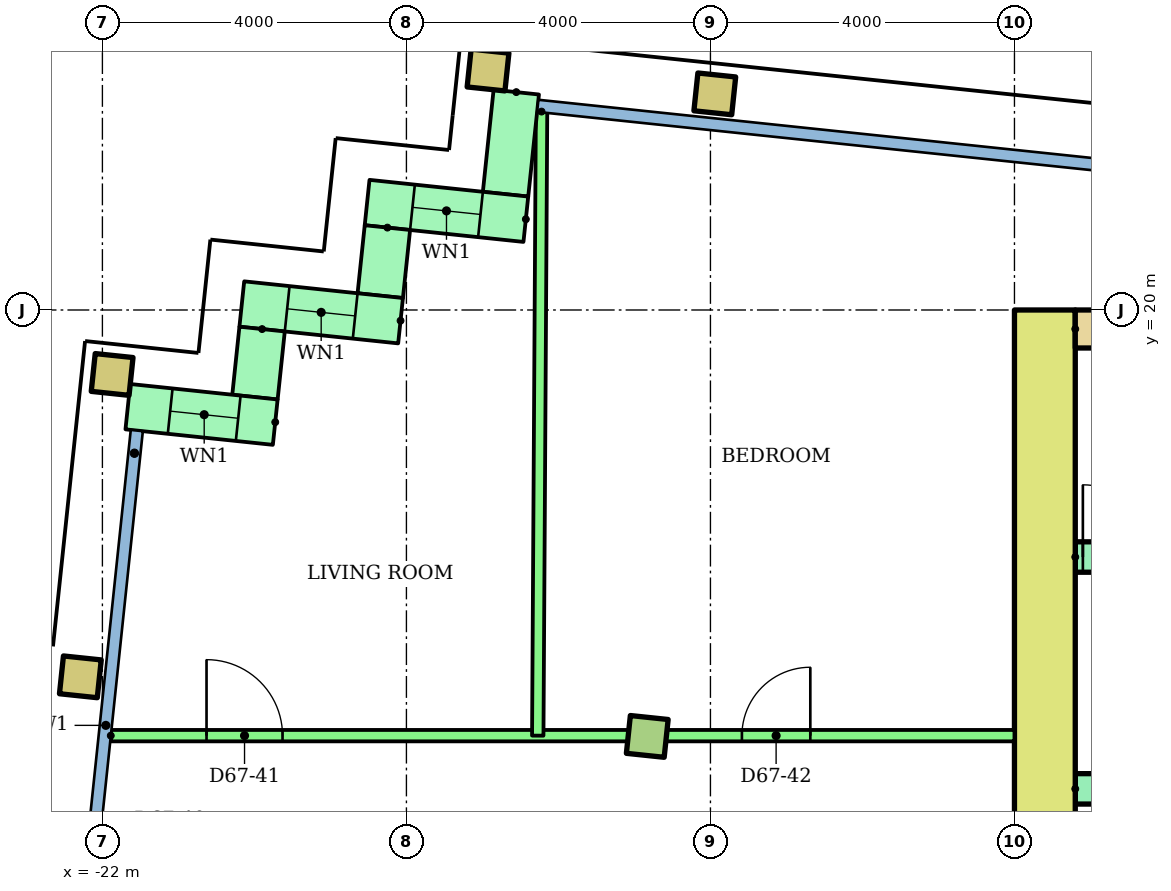
"""IFC4 building model, lengths in metres.
Left out: names, types, materials, properties, quantities, classifications, styles, units other than length and angle.
Written with IfcOpenShell. Run it as: python <this file> out.ifc"""

import sys

from ifc_helpers import new_model, si_unit, direction, frame, frame_2d, origin, origin_2d, place, context, subcontext, project, spatial, rectangle, hollow_rectangle, extrude, element, fill, save


model = new_model("IFC4")
c1 = context("Model", 3, precision=1e-05, world=origin(), true_north=direction((0.0, 1.0)))
c2 = subcontext(c1, "Body", "Model", "MODEL_VIEW")
j1 = project(units=[si_unit("LENGTHUNIT", "METRE"), si_unit("PLANEANGLEUNIT", "RADIAN")], contexts=[c1])
p1 = place(None, origin())
s1 = spatial("IfcSite", under=j1, at=p1, CompositionType="ELEMENT")
p2 = place(p1, origin())
s2 = spatial("IfcBuilding", under=s1, at=p2, CompositionType="ELEMENT")
p3 = place(p2, frame((0.0, 0.0, 259.5)))
s3 = spatial("IfcBuildingStorey", under=s2, at=p3, CompositionType="ELEMENT", Elevation=259.5)
p4 = place(p3, frame((-22.29, 15.174, 0.0), z_axis=(0.0, 0.0, 1.0), x_axis=(0.994521895368, -0.104528463268, 0.0)))
e1 = element("IfcColumn", 1, at=p4, inside=s3, PredefinedType="COLUMN", context=c2, shape_type="SweptSolid", body=[
    extrude(hollow_rectangle(XDim=0.5, YDim=0.5, WallThickness=0.025, at=origin_2d()), origin(), (0.0, 0.0, 1.0), 3.2),
])
p5 = place(p3, frame((-14.831, 14.39, 0.0), z_axis=(0.0, 0.0, 1.0), x_axis=(0.994521895368, -0.104528463268, 0.0)))
e2 = element("IfcColumn", 2, at=p5, inside=s3, PredefinedType="COLUMN", context=c2, shape_type="SweptSolid", body=[
    extrude(rectangle(XDim=0.5, YDim=0.5, at=origin_2d()), origin(), (0.0, 0.0, 1.0), 3.2),
])
for number, where, z_axis, x_axis in (
    (3, (-21.872, 19.152, 0.0), (0.0, 0.0, 1.0), (0.995, -0.105, 0.0)),
    (4, (-16.926, 23.157, 0.0), (0.0, 0.0, 1.0), (0.995, -0.105, 0.0)),
    (5, (-13.943, 22.843, 0.0), (0.0, 0.0, 1.0), (0.995, -0.105, 0.0)),
):
    element("IfcColumn", number, at=place(p3, frame(where, z_axis=z_axis, x_axis=x_axis)), inside=s3, PredefinedType="COLUMN", context=c2, shape_type="SweptSolid", body=[
        extrude(hollow_rectangle(XDim=0.5, YDim=0.5, WallThickness=0.025, at=origin_2d()), origin(), (0.0, 0.0, 1.0), 3.2),
    ])
p6 = place(p3, frame((-16.555, 22.866, 0.0), z_axis=(0.0, 0.0, 1.0), x_axis=(-0.104515354875, -0.994523273029, 0.0)))
e6 = element("IfcWall", 6, at=p6, inside=s3, PredefinedType="STANDARD", context=c2, shape_type="SweptSolid", body=[
    extrude(rectangle(XDim=1.35, YDim=0.6, at=frame_2d((0.675, 0.0))), origin(), (0.0, 0.0, 1.0), 2.92),
])
p7 = place(p3, frame((-16.429, 21.194, 0.0), z_axis=(0.0, 0.0, 1.0), x_axis=(-0.994522640205, 0.104521376379, 0.0)))
e7 = element("IfcWall", 7, at=p7, inside=s3, PredefinedType="STANDARD", context=c2, shape_type="SweptSolid", body=[
    extrude(rectangle(XDim=2.1, YDim=0.6, at=frame_2d((1.05, 0.0))), origin(), (0.0, 0.0, 1.0), 2.92),
])
p8 = place(p7, frame((0.6, 0.0, 0.9)))
e8 = element("IfcOpeningElement", 8, at=p8, cuts=e7, PredefinedType="OPENING", context=c2, shape_type="SweptSolid", body=[
    extrude(rectangle(XDim=0.9, YDim=1.5, at=frame_2d((0.45, 0.75))), frame((0.0, 0.31, 0.0), z_axis=(0.0, -1.0, 0.0), x_axis=(1.0, 0.0, 0.0)), (0.0, 0.0, 1.0), 0.62),
])
p9 = place(p3, frame((-18.25, 21.084, 0.0), z_axis=(0.0, 0.0, 1.0), x_axis=(-0.104416541099, -0.994533652495, 0.0)))
e9 = element("IfcWall", 9, at=p9, inside=s3, PredefinedType="STANDARD", context=c2, shape_type="SweptSolid", body=[
    extrude(rectangle(XDim=0.9, YDim=0.6, at=frame_2d((0.45, 0.0))), origin(), (0.0, 0.0, 1.0), 2.92),
])
p10 = place(p3, frame((-18.077, 19.859, 0.0), z_axis=(0.0, 0.0, 1.0), x_axis=(-0.994522640205, 0.104521376379, 0.0)))
e10 = element("IfcWall", 10, at=p10, inside=s3, PredefinedType="STANDARD", context=c2, shape_type="SweptSolid", body=[
    extrude(rectangle(XDim=2.1, YDim=0.6, at=frame_2d((1.05, 0.0))), origin(), (0.0, 0.0, 1.0), 2.92),
])
p11 = place(p10, frame((0.6, 0.0, 0.9)))
e11 = element("IfcOpeningElement", 11, at=p11, cuts=e10, PredefinedType="OPENING", context=c2, shape_type="SweptSolid", body=[
    extrude(rectangle(XDim=0.9, YDim=1.5, at=frame_2d((0.45, 0.75))), frame((0.0, 0.31, 0.0), z_axis=(0.0, -1.0, 0.0), x_axis=(1.0, 0.0, 0.0)), (0.0, 0.0, 1.0), 0.62),
])
p12 = place(p3, frame((-19.899, 19.749, 0.0), z_axis=(0.0, 0.0, 1.0), x_axis=(-0.104741284723, -0.994499503909, 0.0)))
e12 = element("IfcWall", 12, at=p12, inside=s3, PredefinedType="STANDARD", context=c2, shape_type="SweptSolid", body=[
    extrude(rectangle(XDim=0.9, YDim=0.6, at=frame_2d((0.45, 0.0))), origin(), (0.0, 0.0, 1.0), 2.92),
])
p13 = place(p3, frame((-19.726, 18.524, 0.0), z_axis=(0.0, 0.0, 1.0), x_axis=(-0.994534226826, 0.104411070641, 0.0)))
e13 = element("IfcWall", 13, at=p13, inside=s3, PredefinedType="STANDARD", context=c2, shape_type="SweptSolid", body=[
    extrude(rectangle(XDim=1.95, YDim=0.6, at=frame_2d((0.975, 0.0))), origin(), (0.0, 0.0, 1.0), 2.92),
])
p14 = place(p13, frame((0.49, 0.0, 0.9)))
e14 = element("IfcOpeningElement", 14, at=p14, cuts=e13, PredefinedType="OPENING", context=c2, shape_type="SweptSolid", body=[
    extrude(rectangle(XDim=0.9, YDim=1.5, at=frame_2d((0.45, 0.75))), frame((0.0, 0.31, 0.0), z_axis=(0.0, -1.0, 0.0), x_axis=(1.0, 0.0, 0.0)), (0.0, 0.0, 1.0), 0.62),
])
p15 = place(p3, frame((-9.6, 6.4, 0.0), z_axis=(0.0, 0.0, 1.0), x_axis=(0.0, 1.0, 0.0)))
e15 = element("IfcWall", 15, at=p15, inside=s3, PredefinedType="SHEAR", context=c2, shape_type="SweptSolid", body=[
    extrude(rectangle(XDim=13.6, YDim=0.8, at=frame_2d((6.8, 0.0))), origin(), (0.0, 0.0, 1.0), 2.92),
])
p16 = place(p3, frame((-9.2, 19.75, 0.0)))
e16 = element("IfcWall", 16, at=p16, inside=s3, PredefinedType="SHEAR", context=c2, shape_type="SweptSolid", body=[
    extrude(rectangle(XDim=18.4, YDim=0.5, at=frame_2d((9.2, 0.0))), origin(), (0.0, 0.0, 1.0), 2.92),
])
p17 = place(p3, frame((-9.2, 13.7, 0.0)))
e17 = element("IfcWall", 17, at=p17, inside=s3, PredefinedType="SHEAR", context=c2, shape_type="SweptSolid", body=[
    extrude(rectangle(XDim=8.0, YDim=0.4, at=frame_2d((4.0, 0.0))), origin(), (0.0, 0.0, 1.0), 2.92),
])
p18 = place(p3, frame((-9.2, 16.75, 0.0)))
e18 = element("IfcWall", 18, at=p18, inside=s3, PredefinedType="SHEAR", context=c2, shape_type="SweptSolid", body=[
    extrude(rectangle(XDim=18.4, YDim=0.4, at=frame_2d((9.2, 0.0))), origin(), (0.0, 0.0, 1.0), 2.92),
])
p19 = place(p18, frame((0.1, 0.0, 0.0)))
e19 = element("IfcOpeningElement", 19, at=p19, cuts=e18, PredefinedType="OPENING", context=c2, shape_type="SweptSolid", body=[
    extrude(rectangle(XDim=0.95, YDim=2.1, at=frame_2d((0.475, 1.05))), frame((0.0, 0.21, 0.0), z_axis=(0.0, -1.0, 0.0), x_axis=(1.0, 0.0, 0.0)), (0.0, 0.0, 1.0), 0.42),
])
p20 = place(p18, frame((6.1, 0.0, 0.0)))
e20 = element("IfcOpeningElement", 20, at=p20, cuts=e18, PredefinedType="OPENING", context=c2, shape_type="SweptSolid", body=[
    extrude(rectangle(XDim=0.95, YDim=2.1, at=frame_2d((0.475, 1.05))), frame((0.0, 0.21, 0.0), z_axis=(0.0, -1.0, 0.0), x_axis=(1.0, 0.0, 0.0)), (0.0, 0.0, 1.0), 0.42),
])
p21 = place(p18, frame((12.1, 0.0, 0.0)))
e21 = element("IfcOpeningElement", 21, at=p21, cuts=e18, PredefinedType="OPENING", context=c2, shape_type="SweptSolid", body=[
    extrude(rectangle(XDim=0.95, YDim=2.1, at=frame_2d((0.475, 1.05))), frame((0.0, 0.21, 0.0), z_axis=(0.0, -1.0, 0.0), x_axis=(1.0, 0.0, 0.0)), (0.0, 0.0, 1.0), 0.42),
])
p22 = place(p3, frame((-21.89, 14.4, 0.0)))
e22 = element("IfcWall", 22, at=p22, inside=s3, PredefinedType="PARTITIONING", context=c2, shape_type="SweptSolid", body=[
    extrude(rectangle(XDim=11.89, YDim=0.15, at=frame_2d((5.945, 0.0))), origin(), (0.0, 0.0, 1.0), 2.4),
])
p23 = place(p22, frame((1.26, 0.0, 0.0)))
e23 = element("IfcOpeningElement", 23, at=p23, cuts=e22, PredefinedType="OPENING", context=c2, shape_type="SweptSolid", body=[
    extrude(rectangle(XDim=1.0, YDim=2.1, at=frame_2d((0.5, 1.05))), frame((0.0, 0.085, 0.0), z_axis=(0.0, -1.0, 0.0), x_axis=(1.0, 0.0, 0.0)), (0.0, 0.0, 1.0), 0.17),
])
p24 = place(p22, frame((8.304, 0.0, 0.0)))
e24 = element("IfcOpeningElement", 24, at=p24, cuts=e22, PredefinedType="OPENING", context=c2, shape_type="SweptSolid", body=[
    extrude(rectangle(XDim=0.9, YDim=2.1, at=frame_2d((0.45, 1.05))), frame((0.0, 0.085, 0.0), z_axis=(0.0, -1.0, 0.0), x_axis=(1.0, 0.0, 0.0)), (0.0, 0.0, 1.0), 0.17),
])
p25 = place(p3, frame((-16.222, 22.61, 0.0), z_axis=(0.0, 0.0, 1.0), x_axis=(-0.006095634594, -0.999981421447, 0.0)))
e25 = element("IfcWall", 25, at=p25, inside=s3, PredefinedType="PARTITIONING", context=c2, shape_type="SweptSolid", body=[
    extrude(rectangle(XDim=8.211, YDim=0.15, at=frame_2d((4.105, 0.0))), origin(), (0.0, 0.0, 1.0), 2.4),
])
p26 = place(p8, origin())
e26 = element("IfcWindow", 26, at=p26, inside=s3, PartitioningType="SINGLE_PANEL", PredefinedType="WINDOW", context=c2, shape_type="SweptSolid", body=[
    extrude(rectangle(XDim=0.9, YDim=1.5, at=frame_2d((0.45, 0.75))), frame((0.0, 0.03, 0.0), z_axis=(0.0, -1.0, 0.0), x_axis=(1.0, 0.0, 0.0)), (0.0, 0.0, 1.0), 0.06),
])
fill(e8, e26)
p27 = place(p11, origin())
e27 = element("IfcWindow", 27, at=p27, inside=s3, PartitioningType="SINGLE_PANEL", PredefinedType="WINDOW", context=c2, shape_type="SweptSolid", body=[
    extrude(rectangle(XDim=0.9, YDim=1.5, at=frame_2d((0.45, 0.75))), frame((0.0, 0.03, 0.0), z_axis=(0.0, -1.0, 0.0), x_axis=(1.0, 0.0, 0.0)), (0.0, 0.0, 1.0), 0.06),
])
fill(e11, e27)
p28 = place(p14, origin())
e28 = element("IfcWindow", 28, at=p28, inside=s3, PartitioningType="SINGLE_PANEL", PredefinedType="WINDOW", context=c2, shape_type="SweptSolid", body=[
    extrude(rectangle(XDim=0.9, YDim=1.5, at=frame_2d((0.45, 0.75))), frame((0.0, 0.03, 0.0), z_axis=(0.0, -1.0, 0.0), x_axis=(1.0, 0.0, 0.0)), (0.0, 0.0, 1.0), 0.06),
])
fill(e14, e28)
p29 = place(p19, origin())
e29 = element("IfcDoor", 29, at=p29, inside=s3, OperationType="SINGLE_SWING_LEFT", PredefinedType="DOOR", context=c2, shape_type="SweptSolid", body=[
    extrude(rectangle(XDim=0.95, YDim=2.1, at=frame_2d((0.475, 1.05))), frame((0.0, 0.025, 0.0), z_axis=(0.0, -1.0, 0.0), x_axis=(1.0, 0.0, 0.0)), (0.0, 0.0, 1.0), 0.05),
])
fill(e19, e29)
p30 = place(p23, origin())
e30 = element("IfcDoor", 30, at=p30, inside=s3, OperationType="SINGLE_SWING_LEFT", PredefinedType="DOOR", context=c2, shape_type="SweptSolid", body=[
    extrude(rectangle(XDim=1.0, YDim=2.1, at=frame_2d((0.5, 1.05))), frame((0.0, 0.025, 0.0), z_axis=(0.0, -1.0, 0.0), x_axis=(1.0, 0.0, 0.0)), (0.0, 0.0, 1.0), 0.05),
])
fill(e23, e30)
p31 = place(p24, origin())
e31 = element("IfcDoor", 31, at=p31, inside=s3, OperationType="SINGLE_SWING_RIGHT", PredefinedType="DOOR", context=c2, shape_type="SweptSolid", body=[
    extrude(rectangle(XDim=0.9, YDim=2.1, at=frame_2d((0.45, 1.05))), frame((0.0, 0.025, 0.0), z_axis=(0.0, -1.0, 0.0), x_axis=(1.0, 0.0, 0.0)), (0.0, 0.0, 1.0), 0.05),
])
fill(e24, e31)
save(model, sys.argv[1])
